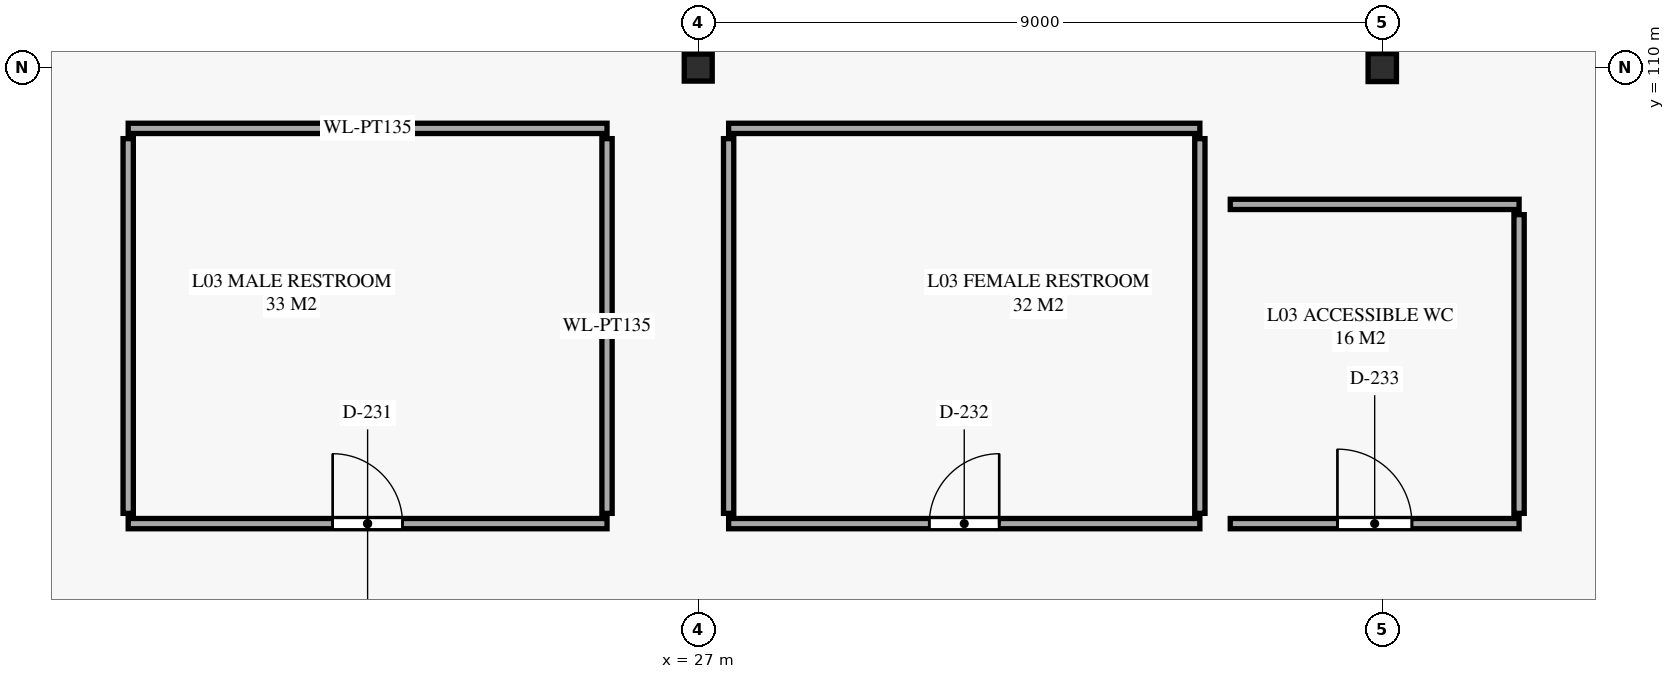
"""IFC4 building model, lengths in metres.
Left out: names, types, materials, properties, quantities, classifications, styles, units other than length and angle.
Written with IfcOpenShell. Run it as: python <this file> out.ifc"""

import sys

from ifc_helpers import new_model, si_unit, direction, frame, frame_2d, origin, origin_2d, place, context, subcontext, project, spatial, rectangle, i_section, extrude, element, fill, save


model = new_model("IFC4")
c1 = context("Model", 3, precision=1e-05, world=origin(), true_north=direction((0.0, 1.0)))
c2 = subcontext(c1, "Body", "Model", "MODEL_VIEW")
j1 = project(units=[si_unit("LENGTHUNIT", "METRE"), si_unit("PLANEANGLEUNIT", "RADIAN")], contexts=[c1])
p1 = place(None, origin())
s1 = spatial("IfcSite", under=j1, at=p1, CompositionType="ELEMENT")
p2 = place(p1, origin())
s2 = spatial("IfcBuilding", under=s1, at=p2, CompositionType="ELEMENT")
p3 = place(p2, frame((0.0, 0.0, 15.0)))
s3 = spatial("IfcBuildingStorey", under=s2, at=p3, CompositionType="ELEMENT", Elevation=15.0)
p4 = place(p3, frame((27.0, 110.0, 0.0), z_axis=(0.0, 0.0, 1.0), x_axis=(1.0, 0.0, 0.0)))
e1 = element("IfcColumn", 1, at=p4, inside=s3, PredefinedType="COLUMN", context=c2, shape_type="SweptSolid", body=[
    extrude(i_section(OverallWidth=0.368, OverallDepth=0.356, WebThickness=0.011, FlangeThickness=0.018, FilletRadius=0.015, at=origin_2d()), origin(), (0.0, 0.0, 1.0), 4.64),
])
p5 = place(p3, frame((36.0, 110.0, 0.0), z_axis=(0.0, 0.0, 1.0), x_axis=(1.0, 0.0, 0.0)))
e2 = element("IfcColumn", 2, at=p5, inside=s3, PredefinedType="COLUMN", context=c2, shape_type="SweptSolid", body=[
    extrude(i_section(OverallWidth=0.373, OverallDepth=0.368, WebThickness=0.015, FlangeThickness=0.024, FilletRadius=0.015, at=origin_2d()), origin(), (0.0, 0.0, 1.0), 5.0),
])
p6 = place(p3, frame((19.5, 104.0, 0.0), z_axis=(0.0, 0.0, 1.0), x_axis=(1.0, 0.0, 0.0)))
e3 = element("IfcWall", 3, at=p6, inside=s3, PredefinedType="PARTITIONING", context=c2, shape_type="SweptSolid", body=[
    extrude(rectangle(XDim=6.3, YDim=0.135, at=frame_2d((3.15, 0.0))), origin(), (0.0, 0.0, 1.0), 4.72),
])
p7 = place(p6, frame((2.69, 0.0, 0.0)))
e4 = element("IfcOpeningElement", 4, at=p7, cuts=e3, PredefinedType="OPENING", context=c2, shape_type="SweptSolid", body=[
    extrude(rectangle(XDim=0.92, YDim=2.1, at=frame_2d((0.46, 1.05))), frame((0.0, 0.078, 0.0), z_axis=(0.0, -1.0, 0.0), x_axis=(1.0, 0.0, 0.0)), (0.0, 0.0, 1.0), 0.155),
])
p8 = place(p3, frame((25.8, 109.2, 0.0), z_axis=(0.0, 0.0, 1.0), x_axis=(-1.0, 0.0, 0.0)))
e5 = element("IfcWall", 5, at=p8, inside=s3, PredefinedType="PARTITIONING", context=c2, shape_type="SweptSolid", body=[
    extrude(rectangle(XDim=6.3, YDim=0.135, at=frame_2d((3.15, 0.0))), origin(), (0.0, 0.0, 1.0), 4.72),
])
for number, where, z_axis, x_axis in (
    (6, (19.5, 109.065, 0.0), (0.0, 0.0, 1.0), (0.0, -1.0, 0.0)),
    (7, (25.8, 104.135, 0.0), (0.0, 0.0, 1.0), (0.0, 1.0, 0.0)),
):
    element("IfcWall", number, at=place(p3, frame(where, z_axis=z_axis, x_axis=x_axis)), inside=s3, PredefinedType="PARTITIONING", context=c2, shape_type="SweptSolid", body=[
        extrude(rectangle(XDim=4.93, YDim=0.135, at=frame_2d((2.465, 0.0))), origin(), (0.0, 0.0, 1.0), 4.72),
    ])
p9 = place(p3, frame((27.4, 104.0, 0.0), z_axis=(0.0, 0.0, 1.0), x_axis=(1.0, 0.0, 0.0)))
e8 = element("IfcWall", 8, at=p9, inside=s3, PredefinedType="PARTITIONING", context=c2, shape_type="SweptSolid", body=[
    extrude(rectangle(XDim=6.2, YDim=0.135, at=frame_2d((3.1, 0.0))), origin(), (0.0, 0.0, 1.0), 4.72),
])
p10 = place(p9, frame((2.64, 0.0, 0.0)))
e9 = element("IfcOpeningElement", 9, at=p10, cuts=e8, PredefinedType="OPENING", context=c2, shape_type="SweptSolid", body=[
    extrude(rectangle(XDim=0.92, YDim=2.1, at=frame_2d((0.46, 1.05))), frame((0.0, 0.078, 0.0), z_axis=(0.0, -1.0, 0.0), x_axis=(1.0, 0.0, 0.0)), (0.0, 0.0, 1.0), 0.155),
])
p11 = place(p3, frame((33.6, 109.2, 0.0), z_axis=(0.0, 0.0, 1.0), x_axis=(-1.0, 0.0, 0.0)))
e10 = element("IfcWall", 10, at=p11, inside=s3, PredefinedType="PARTITIONING", context=c2, shape_type="SweptSolid", body=[
    extrude(rectangle(XDim=6.2, YDim=0.135, at=frame_2d((3.1, 0.0))), origin(), (0.0, 0.0, 1.0), 4.72),
])
for number, where, z_axis, x_axis in (
    (11, (27.4, 109.065, 0.0), (0.0, 0.0, 1.0), (0.0, -1.0, 0.0)),
    (12, (33.6, 104.135, 0.0), (0.0, 0.0, 1.0), (0.0, 1.0, 0.0)),
):
    element("IfcWall", number, at=place(p3, frame(where, z_axis=z_axis, x_axis=x_axis)), inside=s3, PredefinedType="PARTITIONING", context=c2, shape_type="SweptSolid", body=[
        extrude(rectangle(XDim=4.93, YDim=0.135, at=frame_2d((2.465, 0.0))), origin(), (0.0, 0.0, 1.0), 4.72),
    ])
p12 = place(p3, frame((34.0, 104.0, 0.0), z_axis=(0.0, 0.0, 1.0), x_axis=(1.0, 0.0, 0.0)))
e13 = element("IfcWall", 13, at=p12, inside=s3, PredefinedType="PARTITIONING", context=c2, shape_type="SweptSolid", body=[
    extrude(rectangle(XDim=3.8, YDim=0.135, at=frame_2d((1.9, 0.0))), origin(), (0.0, 0.0, 1.0), 4.72),
])
p13 = place(p12, frame((1.41, 0.0, 0.0)))
e14 = element("IfcOpeningElement", 14, at=p13, cuts=e13, PredefinedType="OPENING", context=c2, shape_type="SweptSolid", body=[
    extrude(rectangle(XDim=0.98, YDim=2.1, at=frame_2d((0.49, 1.05))), frame((0.0, 0.078, 0.0), z_axis=(0.0, -1.0, 0.0), x_axis=(1.0, 0.0, 0.0)), (0.0, 0.0, 1.0), 0.155),
])
p14 = place(p3, frame((37.8, 108.2, 0.0), z_axis=(0.0, 0.0, 1.0), x_axis=(-1.0, 0.0, 0.0)))
e15 = element("IfcWall", 15, at=p14, inside=s3, PredefinedType="PARTITIONING", context=c2, shape_type="SweptSolid", body=[
    extrude(rectangle(XDim=3.8, YDim=0.135, at=frame_2d((1.9, 0.0))), origin(), (0.0, 0.0, 1.0), 4.72),
])
p15 = place(p3, frame((37.8, 104.135, 0.0), z_axis=(0.0, 0.0, 1.0), x_axis=(0.0, 1.0, 0.0)))
e16 = element("IfcWall", 16, at=p15, inside=s3, PredefinedType="PARTITIONING", context=c2, shape_type="SweptSolid", body=[
    extrude(rectangle(XDim=3.93, YDim=0.135, at=frame_2d((1.965, 0.0))), origin(), (0.0, 0.0, 1.0), 4.72),
])
p16 = place(p7, origin())
e17 = element("IfcDoor", 17, at=p16, inside=s3, OperationType="SINGLE_SWING_LEFT", PredefinedType="DOOR", context=c2, shape_type="SweptSolid", body=[
    extrude(rectangle(XDim=0.92, YDim=2.1, at=frame_2d((0.46, 1.05))), frame((0.0, 0.025, 0.0), z_axis=(0.0, -1.0, 0.0), x_axis=(1.0, 0.0, 0.0)), (0.0, 0.0, 1.0), 0.05),
])
fill(e4, e17)
p17 = place(p10, origin())
e18 = element("IfcDoor", 18, at=p17, inside=s3, OperationType="SINGLE_SWING_RIGHT", PredefinedType="DOOR", context=c2, shape_type="SweptSolid", body=[
    extrude(rectangle(XDim=0.92, YDim=2.1, at=frame_2d((0.46, 1.05))), frame((0.0, 0.025, 0.0), z_axis=(0.0, -1.0, 0.0), x_axis=(1.0, 0.0, 0.0)), (0.0, 0.0, 1.0), 0.05),
])
fill(e9, e18)
p18 = place(p13, origin())
e19 = element("IfcDoor", 19, at=p18, inside=s3, OperationType="SINGLE_SWING_LEFT", PredefinedType="DOOR", context=c2, shape_type="SweptSolid", body=[
    extrude(rectangle(XDim=0.98, YDim=2.1, at=frame_2d((0.49, 1.05))), frame((0.0, 0.025, 0.0), z_axis=(0.0, -1.0, 0.0), x_axis=(1.0, 0.0, 0.0)), (0.0, 0.0, 1.0), 0.05),
])
fill(e14, e19)
save(model, sys.argv[1])
